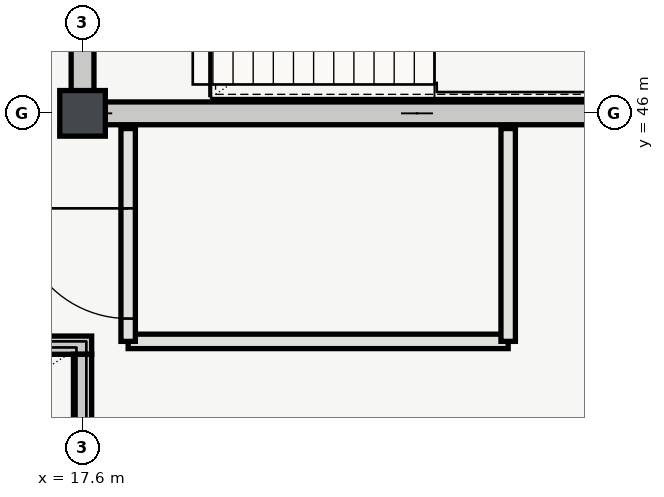
"""IFC4 building model, lengths in metres.
Left out: names, types, materials, properties, quantities, classifications, styles, units other than length and angle.
Written with IfcOpenShell. Run it as: python <this file> out.ifc"""

import sys

from ifc_helpers import new_model, si_unit, direction, frame, frame_2d, origin, origin_2d, place, context, subcontext, project, spatial, rectangle, extrude, element, fill, save


model = new_model("IFC4")
c1 = context("Model", 3, precision=1e-05, world=origin(), true_north=direction((0.0, 1.0)))
c2 = subcontext(c1, "Body", "Model", "MODEL_VIEW")
j1 = project(units=[si_unit("LENGTHUNIT", "METRE"), si_unit("PLANEANGLEUNIT", "RADIAN")], contexts=[c1])
p1 = place(None, origin())
s1 = spatial("IfcSite", under=j1, at=p1, CompositionType="ELEMENT")
p2 = place(p1, origin())
s2 = spatial("IfcBuilding", under=s1, at=p2, CompositionType="ELEMENT")
p3 = place(p2, frame((0.0, 0.0, 28.8)))
s3 = spatial("IfcBuildingStorey", under=s2, at=p3, CompositionType="ELEMENT", Elevation=28.8)
p4 = place(p3, frame((17.6, 46.0, 0.0), z_axis=(0.0, 0.0, 1.0), x_axis=(1.0, 0.0, 0.0)))
e1 = element("IfcColumn", 1, at=p4, inside=s3, PredefinedType="COLUMN", context=c2, shape_type="SweptSolid", body=[
    extrude(rectangle(XDim=0.6, YDim=0.6, at=origin_2d()), origin(), (0.0, 0.0, 1.0), 4.2),
])
p5 = place(p3, frame((17.45, 46.0, 0.0), z_axis=(0.0, 0.0, 1.0), x_axis=(1.0, 0.0, 0.0)))
e2 = element("IfcWall", 2, at=p5, inside=s3, PredefinedType="SHEAR", context=c2, shape_type="SweptSolid", body=[
    extrude(rectangle(XDim=9.1, YDim=0.3, at=frame_2d((4.55, 0.0))), origin(), (0.0, 0.0, 1.0), 3.92),
])
p6 = place(p3, frame((17.6, 46.15, 0.0), z_axis=(0.0, 0.0, 1.0), x_axis=(0.0, 1.0, 0.0)))
e3 = element("IfcWall", 3, at=p6, inside=s3, PredefinedType="SHEAR", context=c2, shape_type="SweptSolid", body=[
    extrude(rectangle(XDim=7.7, YDim=0.3, at=frame_2d((3.85, 0.0))), origin(), (0.0, 0.0, 1.0), 3.92),
])
p7 = place(p6, frame((1.675, 0.0, 0.0)))
e4 = element("IfcOpeningElement", 4, at=p7, cuts=e3, PredefinedType="OPENING", context=c2, shape_type="SweptSolid", body=[
    extrude(rectangle(XDim=1.35, YDim=2.2, at=frame_2d((0.675, 1.1))), frame((0.0, 0.16, 0.0), z_axis=(0.0, -1.0, 0.0), x_axis=(1.0, 0.0, 0.0)), (0.0, 0.0, 1.0), 0.32),
])
p8 = place(p3, frame((18.2, 43.0, 0.0), z_axis=(0.0, 0.0, 1.0), x_axis=(1.0, 0.0, 0.0)))
e5 = element("IfcWall", 5, at=p8, inside=s3, PredefinedType="PARTITIONING", context=c2, shape_type="SweptSolid", body=[
    extrude(rectangle(XDim=5.0, YDim=0.19, at=frame_2d((2.5, 0.0))), origin(), (0.0, 0.0, 1.0), 3.92),
])
p9 = place(p3, frame((18.2, 45.8, 0.0), z_axis=(0.0, 0.0, 1.0), x_axis=(0.0, -1.0, 0.0)))
e6 = element("IfcWall", 6, at=p9, inside=s3, PredefinedType="PARTITIONING", context=c2, shape_type="SweptSolid", body=[
    extrude(rectangle(XDim=2.8, YDim=0.19, at=frame_2d((1.4, 0.0))), origin(), (0.0, 0.0, 1.0), 3.92),
])
p10 = place(p9, frame((1.05, 0.0, 0.0)))
e7 = element("IfcOpeningElement", 7, at=p10, cuts=e6, PredefinedType="OPENING", context=c2, shape_type="SweptSolid", body=[
    extrude(rectangle(XDim=1.45, YDim=2.2, at=frame_2d((0.725, 1.1))), frame((0.0, 0.105, 0.0), z_axis=(0.0, -1.0, 0.0), x_axis=(1.0, 0.0, 0.0)), (0.0, 0.0, 1.0), 0.21),
])
p11 = place(p3, frame((23.2, 43.0, 0.0), z_axis=(0.0, 0.0, 1.0), x_axis=(0.0, 1.0, 0.0)))
e8 = element("IfcWall", 8, at=p11, inside=s3, PredefinedType="PARTITIONING", context=c2, shape_type="SweptSolid", body=[
    extrude(rectangle(XDim=2.8, YDim=0.19, at=frame_2d((1.4, 0.0))), origin(), (0.0, 0.0, 1.0), 3.92),
])
p12 = place(p3, frame((17.72, 42.95, 0.0), z_axis=(0.0, 0.0, 1.0), x_axis=(-1.0, 0.0, 0.0)))
e9 = element("IfcWall", 9, at=p12, inside=s3, PredefinedType="SHEAR", context=c2, shape_type="SweptSolid", body=[
    extrude(rectangle(XDim=9.04, YDim=0.24, at=frame_2d((4.52, 0.0))), origin(), (0.0, 0.0, 1.0), 3.95),
])
p13 = place(p3, frame((17.6, 38.67, 0.0), z_axis=(0.0, 0.0, 1.0), x_axis=(0.0, 1.0, 0.0)))
e10 = element("IfcWall", 10, at=p13, inside=s3, PredefinedType="SHEAR", context=c2, shape_type="SweptSolid", body=[
    extrude(rectangle(XDim=4.16, YDim=0.24, at=frame_2d((2.08, 0.0))), origin(), (0.0, 0.0, 1.0), 3.95),
])
p14 = place(p10, origin())
e11 = element("IfcDoor", 11, at=p14, inside=s3, OperationType="SINGLE_SWING_LEFT", PredefinedType="DOOR", context=c2, shape_type="SweptSolid", body=[
    extrude(rectangle(XDim=1.45, YDim=2.2, at=frame_2d((0.725, 1.1))), frame((0.0, 0.025, 0.0), z_axis=(0.0, -1.0, 0.0), x_axis=(1.0, 0.0, 0.0)), (0.0, 0.0, 1.0), 0.05),
])
fill(e7, e11)
save(model, sys.argv[1])
